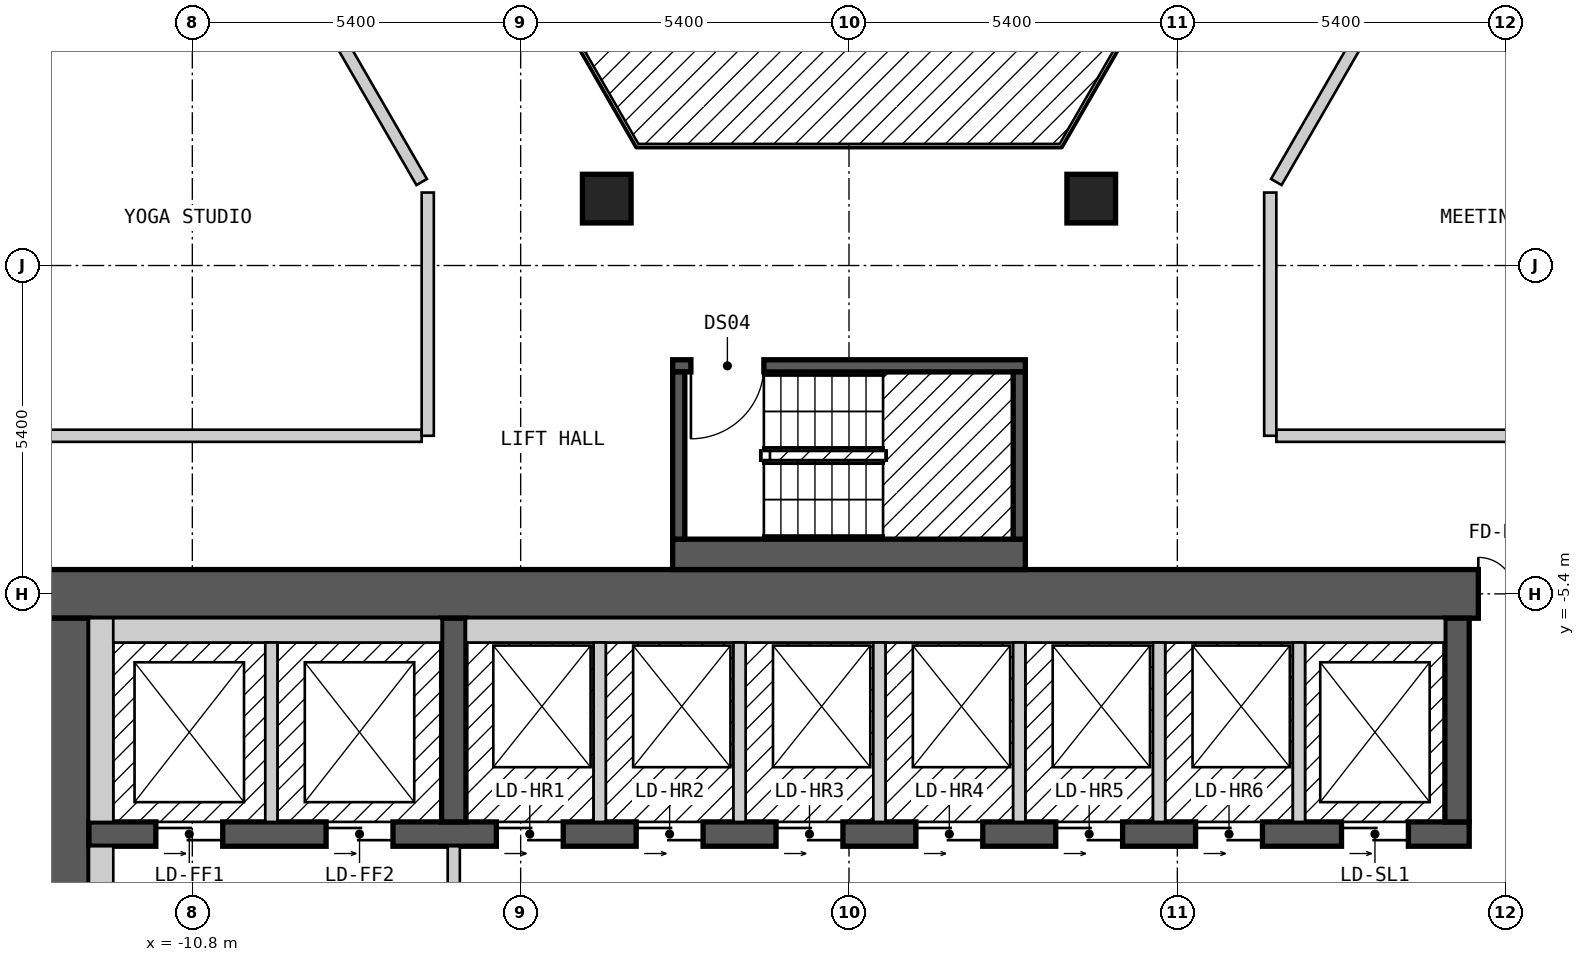
"""IFC4 building model, lengths in metres.
Left out: names, types, materials, properties, quantities, classifications, styles, units other than length and angle.
Written with IfcOpenShell. Run it as: python <this file> out.ifc"""

import sys

from ifc_helpers import new_model, si_unit, direction, frame, frame_2d, origin, origin_2d, place, context, subcontext, project, spatial, rectangle, extrude, element, fill, save


model = new_model("IFC4")
c1 = context("Model", 3, precision=1e-05, world=origin(), true_north=direction((0.0, 1.0)))
c2 = subcontext(c1, "Body", "Model", "MODEL_VIEW")
j1 = project(units=[si_unit("LENGTHUNIT", "METRE"), si_unit("PLANEANGLEUNIT", "RADIAN")], contexts=[c1])
p1 = place(None, origin())
s1 = spatial("IfcSite", under=j1, at=p1, CompositionType="ELEMENT")
p2 = place(p1, origin())
s2 = spatial("IfcBuilding", under=s1, at=p2, CompositionType="ELEMENT")
p3 = place(p2, frame((0.0, 0.0, 147.6)))
s3 = spatial("IfcBuildingStorey", under=s2, at=p3, CompositionType="ELEMENT", Elevation=147.6)
for number, where, z_axis, x_axis in (
    (1, (3.984, 1.1, 0.0), (0.0, 0.0, 1.0), (1.0, 0.0, 0.0)),
    (2, (-3.984, 1.1, 0.0), (0.0, 0.0, 1.0), (1.0, 0.0, 0.0)),
):
    element("IfcColumn", number, at=place(p3, frame(where, z_axis=z_axis, x_axis=x_axis)), inside=s3, PredefinedType="COLUMN", context=c2, shape_type="SweptSolid", body=[
        extrude(rectangle(XDim=0.8, YDim=0.8, at=origin_2d()), origin(), (0.0, 0.0, 1.0), 3.0),
    ])
p4 = place(p3, frame((-13.3, -5.4, 0.0), z_axis=(0.0, 0.0, 1.0), x_axis=(1.0, 0.0, 0.0)))
e3 = element("IfcWall", 3, at=p4, inside=s3, PredefinedType="SHEAR", context=c2, shape_type="SweptSolid", body=[
    extrude(rectangle(XDim=26.6, YDim=0.8, at=frame_2d((13.3, 0.0))), origin(), (0.0, 0.0, 1.0), 2.7),
])
p5 = place(p4, frame((23.65, 0.0, 0.0)))
e4 = element("IfcOpeningElement", 4, at=p5, cuts=e3, PredefinedType="OPENING", context=c2, shape_type="SweptSolid", body=[
    extrude(rectangle(XDim=1.2, YDim=2.1, at=frame_2d((0.6, 1.05))), frame((0.0, 0.41, 0.0), z_axis=(0.0, -1.0, 0.0), x_axis=(1.0, 0.0, 0.0)), (0.0, 0.0, 1.0), 0.82),
])
p6 = place(p3, frame((-12.9, -18.2, 0.0), z_axis=(0.0, 0.0, 1.0), x_axis=(0.0, 1.0, 0.0)))
e5 = element("IfcWall", 5, at=p6, inside=s3, PredefinedType="SHEAR", context=c2, shape_type="SweptSolid", body=[
    extrude(rectangle(XDim=12.4, YDim=0.8, at=frame_2d((6.2, 0.0))), origin(), (0.0, 0.0, 1.0), 2.7),
])
p7 = place(p6, frame((4.0, 0.0, 0.0)))
e6 = element("IfcOpeningElement", 6, at=p7, cuts=e5, PredefinedType="OPENING", context=c2, shape_type="SweptSolid", body=[
    extrude(rectangle(XDim=1.2, YDim=2.1, at=frame_2d((0.6, 1.05))), frame((0.0, 0.41, 0.0), z_axis=(0.0, -1.0, 0.0), x_axis=(1.0, 0.0, 0.0)), (0.0, 0.0, 1.0), 0.82),
])
p8 = place(p3, frame((-12.5, -9.35, 0.0), z_axis=(0.0, 0.0, 1.0), x_axis=(1.0, 0.0, 0.0)))
e7 = element("IfcWall", 7, at=p8, inside=s3, PredefinedType="SHEAR", context=c2, shape_type="SweptSolid", body=[
    extrude(rectangle(XDim=22.7, YDim=0.4, at=frame_2d((11.35, 0.0))), origin(), (0.0, 0.0, 1.0), 2.7),
])
p9 = place(p8, frame((1.1, 0.0, 0.0)))
e8 = element("IfcOpeningElement", 8, at=p9, cuts=e7, PredefinedType="OPENING", context=c2, shape_type="SweptSolid", body=[
    extrude(rectangle(XDim=1.1, YDim=2.1, at=frame_2d((0.55, 1.05))), frame((0.0, 0.21, 0.0), z_axis=(0.0, -1.0, 0.0), x_axis=(1.0, 0.0, 0.0)), (0.0, 0.0, 1.0), 0.42),
])
p10 = place(p8, frame((3.9, 0.0, 0.0)))
e9 = element("IfcOpeningElement", 9, at=p10, cuts=e7, PredefinedType="OPENING", context=c2, shape_type="SweptSolid", body=[
    extrude(rectangle(XDim=1.1, YDim=2.1, at=frame_2d((0.55, 1.05))), frame((0.0, 0.21, 0.0), z_axis=(0.0, -1.0, 0.0), x_axis=(1.0, 0.0, 0.0)), (0.0, 0.0, 1.0), 0.42),
])
p11 = place(p8, frame((6.7, 0.0, 0.0)))
e10 = element("IfcOpeningElement", 10, at=p11, cuts=e7, PredefinedType="OPENING", context=c2, shape_type="SweptSolid", body=[
    extrude(rectangle(XDim=1.1, YDim=2.1, at=frame_2d((0.55, 1.05))), frame((0.0, 0.21, 0.0), z_axis=(0.0, -1.0, 0.0), x_axis=(1.0, 0.0, 0.0)), (0.0, 0.0, 1.0), 0.42),
])
p12 = place(p8, frame((9.0, 0.0, 0.0)))
e11 = element("IfcOpeningElement", 11, at=p12, cuts=e7, PredefinedType="OPENING", context=c2, shape_type="SweptSolid", body=[
    extrude(rectangle(XDim=1.1, YDim=2.1, at=frame_2d((0.55, 1.05))), frame((0.0, 0.21, 0.0), z_axis=(0.0, -1.0, 0.0), x_axis=(1.0, 0.0, 0.0)), (0.0, 0.0, 1.0), 0.42),
])
p13 = place(p8, frame((11.3, 0.0, 0.0)))
e12 = element("IfcOpeningElement", 12, at=p13, cuts=e7, PredefinedType="OPENING", context=c2, shape_type="SweptSolid", body=[
    extrude(rectangle(XDim=1.1, YDim=2.1, at=frame_2d((0.55, 1.05))), frame((0.0, 0.21, 0.0), z_axis=(0.0, -1.0, 0.0), x_axis=(1.0, 0.0, 0.0)), (0.0, 0.0, 1.0), 0.42),
])
p14 = place(p8, frame((13.6, 0.0, 0.0)))
e13 = element("IfcOpeningElement", 13, at=p14, cuts=e7, PredefinedType="OPENING", context=c2, shape_type="SweptSolid", body=[
    extrude(rectangle(XDim=1.1, YDim=2.1, at=frame_2d((0.55, 1.05))), frame((0.0, 0.21, 0.0), z_axis=(0.0, -1.0, 0.0), x_axis=(1.0, 0.0, 0.0)), (0.0, 0.0, 1.0), 0.42),
])
p15 = place(p8, frame((15.9, 0.0, 0.0)))
e14 = element("IfcOpeningElement", 14, at=p15, cuts=e7, PredefinedType="OPENING", context=c2, shape_type="SweptSolid", body=[
    extrude(rectangle(XDim=1.1, YDim=2.1, at=frame_2d((0.55, 1.05))), frame((0.0, 0.21, 0.0), z_axis=(0.0, -1.0, 0.0), x_axis=(1.0, 0.0, 0.0)), (0.0, 0.0, 1.0), 0.42),
])
p16 = place(p8, frame((18.2, 0.0, 0.0)))
e15 = element("IfcOpeningElement", 15, at=p16, cuts=e7, PredefinedType="OPENING", context=c2, shape_type="SweptSolid", body=[
    extrude(rectangle(XDim=1.1, YDim=2.1, at=frame_2d((0.55, 1.05))), frame((0.0, 0.21, 0.0), z_axis=(0.0, -1.0, 0.0), x_axis=(1.0, 0.0, 0.0)), (0.0, 0.0, 1.0), 0.42),
])
p17 = place(p8, frame((20.6, 0.0, 0.0)))
e16 = element("IfcOpeningElement", 16, at=p17, cuts=e7, PredefinedType="OPENING", context=c2, shape_type="SweptSolid", body=[
    extrude(rectangle(XDim=1.1, YDim=2.1, at=frame_2d((0.55, 1.05))), frame((0.0, 0.21, 0.0), z_axis=(0.0, -1.0, 0.0), x_axis=(1.0, 0.0, 0.0)), (0.0, 0.0, 1.0), 0.42),
])
for number, where, z_axis, x_axis in (
    (17, (-6.5, -9.15, 0.0), (0.0, 0.0, 1.0), (0.0, 1.0, 0.0)),
    (18, (10.0, -9.15, 0.0), (0.0, 0.0, 1.0), (0.0, 1.0, 0.0)),
):
    element("IfcWall", number, at=place(p3, frame(where, z_axis=z_axis, x_axis=x_axis)), inside=s3, PredefinedType="SHEAR", context=c2, shape_type="SweptSolid", body=[
        extrude(rectangle(XDim=3.35, YDim=0.4, at=frame_2d((1.675, 0.0))), origin(), (0.0, 0.0, 1.0), 2.7),
    ])
p18 = place(p3, frame((-2.9, -4.75, 0.0), z_axis=(0.0, 0.0, 1.0), x_axis=(1.0, 0.0, 0.0)))
e19 = element("IfcWall", 19, at=p18, inside=s3, PredefinedType="SOLIDWALL", context=c2, shape_type="SweptSolid", body=[
    extrude(rectangle(XDim=5.8, YDim=0.5, at=frame_2d((2.9, 0.0))), origin(), (0.0, 0.0, 1.0), 2.7),
])
p19 = place(p3, frame((-2.9, -1.65, 0.0), z_axis=(0.0, 0.0, 1.0), x_axis=(1.0, 0.0, 0.0)))
e20 = element("IfcWall", 20, at=p19, inside=s3, PredefinedType="SOLIDWALL", context=c2, shape_type="SweptSolid", body=[
    extrude(rectangle(XDim=5.8, YDim=0.2, at=frame_2d((2.9, 0.0))), origin(), (0.0, 0.0, 1.0), 2.7),
])
p20 = place(p19, frame((0.3, 0.0, 0.0)))
e21 = element("IfcOpeningElement", 21, at=p20, cuts=e20, PredefinedType="OPENING", context=c2, shape_type="SweptSolid", body=[
    extrude(rectangle(XDim=1.2, YDim=2.1, at=frame_2d((0.6, 1.05))), frame((0.0, 0.11, 0.0), z_axis=(0.0, -1.0, 0.0), x_axis=(1.0, 0.0, 0.0)), (0.0, 0.0, 1.0), 0.22),
])
for number, where, z_axis, x_axis in (
    (22, (-2.8, -4.5, 0.0), (0.0, 0.0, 1.0), (0.0, 1.0, 0.0)),
    (23, (2.8, -4.5, 0.0), (0.0, 0.0, 1.0), (0.0, 1.0, 0.0)),
):
    element("IfcWall", number, at=place(p3, frame(where, z_axis=z_axis, x_axis=x_axis)), inside=s3, PredefinedType="SOLIDWALL", context=c2, shape_type="SweptSolid", body=[
        extrude(rectangle(XDim=2.75, YDim=0.2, at=frame_2d((1.375, 0.0))), origin(), (0.0, 0.0, 1.0), 2.7),
    ])
p21 = place(p3, frame((-10.796, 7.9, 0.0), z_axis=(0.0, 0.0, 1.0), x_axis=(0.499954271211, -0.866051803703, 0.0)))
e24 = element("IfcWall", 24, at=p21, inside=s3, PredefinedType="PARTITIONING", context=c2, shape_type="SweptSolid", body=[
    extrude(rectangle(XDim=7.536, YDim=0.2, at=frame_2d((3.768, 0.0))), origin(), (0.0, 0.0, 1.0), 2.7),
])
p22 = place(p3, frame((7.967, 13.0, 0.0), z_axis=(0.0, 0.0, 1.0), x_axis=(0.50003774998, -0.866003607726, 0.0)))
e25 = element("IfcWall", 25, at=p22, inside=s3, PredefinedType="PARTITIONING", context=c2, shape_type="SweptSolid", body=[
    extrude(rectangle(XDim=14.433, YDim=0.2, at=frame_2d((7.217, 0.0))), origin(), (0.0, 0.0, 1.0), 2.7),
])
p23 = place(p22, frame((6.824, 0.0, 0.0)))
e26 = element("IfcOpeningElement", 26, at=p23, cuts=e25, PredefinedType="OPENING", context=c2, shape_type="SweptSolid", body=[
    extrude(rectangle(XDim=0.9, YDim=2.1, at=frame_2d((0.45, 1.05))), frame((0.0, 0.11, 0.0), z_axis=(0.0, -1.0, 0.0), x_axis=(1.0, 0.0, 0.0)), (0.0, 0.0, 1.0), 0.22),
])
p24 = place(p3, frame((9.296, 15.1, 0.0), z_axis=(0.0, 0.0, 1.0), x_axis=(0.499974024244, -0.866040400375, 0.0)))
e27 = element("IfcWall", 27, at=p24, inside=s3, PredefinedType="PARTITIONING", context=c2, shape_type="SweptSolid", body=[
    extrude(rectangle(XDim=16.857, YDim=0.2, at=frame_2d((8.429, 0.0))), origin(), (0.0, 0.0, 1.0), 2.7),
])
p25 = place(p24, frame((5.209, 0.0, 0.0)))
e28 = element("IfcOpeningElement", 28, at=p25, cuts=e27, PredefinedType="OPENING", context=c2, shape_type="SweptSolid", body=[
    extrude(rectangle(XDim=1.0, YDim=2.1, at=frame_2d((0.5, 1.05))), frame((0.0, 0.11, 0.0), z_axis=(0.0, -1.0, 0.0), x_axis=(1.0, 0.0, 0.0)), (0.0, 0.0, 1.0), 0.22),
])
p26 = place(p3, frame((-13.395, -2.8, 0.0), z_axis=(0.0, 0.0, 1.0), x_axis=(1.0, 0.0, 0.0)))
e29 = element("IfcWall", 29, at=p26, inside=s3, PredefinedType="PARTITIONING", context=c2, shape_type="SweptSolid", body=[
    extrude(rectangle(XDim=6.367, YDim=0.2, at=frame_2d((3.184, 0.0))), origin(), (0.0, 0.0, 1.0), 2.7),
])
p27 = place(p3, frame((7.028, -2.8, 0.0), z_axis=(0.0, 0.0, 1.0), x_axis=(1.0, 0.0, 0.0)))
e30 = element("IfcWall", 30, at=p27, inside=s3, PredefinedType="PARTITIONING", context=c2, shape_type="SweptSolid", body=[
    extrude(rectangle(XDim=6.25, YDim=0.2, at=frame_2d((3.125, 0.0))), origin(), (0.0, 0.0, 1.0), 2.7),
])
p28 = place(p3, frame((7.028, 1.373, 0.0), z_axis=(0.0, 0.0, 1.0), x_axis=(0.499954271211, 0.866051803703, 0.0)))
e31 = element("IfcWall", 31, at=p28, inside=s3, PredefinedType="PARTITIONING", context=c2, shape_type="SweptSolid", body=[
    extrude(rectangle(XDim=7.536, YDim=0.2, at=frame_2d((3.768, 0.0))), origin(), (0.0, 0.0, 1.0), 2.7),
])
p29 = place(p3, frame((-15.242, 0.399, 0.0), z_axis=(0.0, 0.0, 1.0), x_axis=(0.499953615651, 0.866052182145, 0.0)))
e32 = element("IfcWall", 32, at=p29, inside=s3, PredefinedType="PARTITIONING", context=c2, shape_type="SweptSolid", body=[
    extrude(rectangle(XDim=8.777, YDim=0.2, at=frame_2d((4.388, 0.0))), origin(), (0.0, 0.0, 1.0), 2.7),
])
p30 = place(p29, frame((3.938, 0.0, 0.0)))
e33 = element("IfcOpeningElement", 33, at=p30, cuts=e32, PredefinedType="OPENING", context=c2, shape_type="SweptSolid", body=[
    extrude(rectangle(XDim=0.9, YDim=2.1, at=frame_2d((0.45, 1.05))), frame((0.0, 0.11, 0.0), z_axis=(0.0, -1.0, 0.0), x_axis=(1.0, 0.0, 0.0)), (0.0, 0.0, 1.0), 0.22),
])
p31 = place(p3, frame((-17.724, 0.5, 0.0), z_axis=(0.0, 0.0, 1.0), x_axis=(0.499994801602, 0.86602840506, 0.0)))
e34 = element("IfcWall", 34, at=p31, inside=s3, PredefinedType="PARTITIONING", context=c2, shape_type="SweptSolid", body=[
    extrude(rectangle(XDim=16.916, YDim=0.2, at=frame_2d((8.458, 0.0))), origin(), (0.0, 0.0, 1.0), 2.7),
])
p32 = place(p31, frame((10.672, 0.0, 0.0)))
e35 = element("IfcOpeningElement", 35, at=p32, cuts=e34, PredefinedType="OPENING", context=c2, shape_type="SweptSolid", body=[
    extrude(rectangle(XDim=1.0, YDim=2.1, at=frame_2d((0.5, 1.05))), frame((0.0, 0.11, 0.0), z_axis=(0.0, -1.0, 0.0), x_axis=(1.0, 0.0, 0.0)), (0.0, 0.0, 1.0), 0.22),
])
p33 = place(p31, frame((5.187, 0.0, 0.0)))
e36 = element("IfcOpeningElement", 36, at=p33, cuts=e34, PredefinedType="OPENING", context=c2, shape_type="SweptSolid", body=[
    extrude(rectangle(XDim=1.0, YDim=2.1, at=frame_2d((0.5, 1.05))), frame((0.0, 0.11, 0.0), z_axis=(0.0, -1.0, 0.0), x_axis=(1.0, 0.0, 0.0)), (0.0, 0.0, 1.0), 0.22),
])
p34 = place(p31, frame((0.566, 0.0, 0.0)))
e37 = element("IfcOpeningElement", 37, at=p34, cuts=e34, PredefinedType="OPENING", context=c2, shape_type="SweptSolid", body=[
    extrude(rectangle(XDim=1.0, YDim=2.1, at=frame_2d((0.5, 1.05))), frame((0.0, 0.11, 0.0), z_axis=(0.0, -1.0, 0.0), x_axis=(1.0, 0.0, 0.0)), (0.0, 0.0, 1.0), 0.22),
])
for number, where, z_axis, x_axis in (
    (38, (6.928, -2.8, 0.0), (0.0, 0.0, 1.0), (0.0, 1.0, 0.0)),
    (39, (-6.928, -2.8, 0.0), (0.0, 0.0, 1.0), (0.0, 1.0, 0.0)),
):
    element("IfcWall", number, at=place(p3, frame(where, z_axis=z_axis, x_axis=x_axis)), inside=s3, PredefinedType="PARTITIONING", context=c2, shape_type="SweptSolid", body=[
        extrude(rectangle(XDim=4.0, YDim=0.2, at=frame_2d((2.0, 0.0))), origin(), (0.0, 0.0, 1.0), 2.7),
    ])
p35 = place(p3, frame((-12.3, -13.0, 0.0), z_axis=(0.0, 0.0, 1.0), x_axis=(0.0, 1.0, 0.0)))
e40 = element("IfcWall", 40, at=p35, inside=s3, PredefinedType="PARTITIONING", context=c2, shape_type="SweptSolid", body=[
    extrude(rectangle(XDim=3.45, YDim=0.4, at=frame_2d((1.725, 0.0))), origin(), (0.0, 0.0, 1.0), 2.7),
])
p36 = place(p3, frame((-12.3, -9.15, 0.0), z_axis=(0.0, 0.0, 1.0), x_axis=(0.0, 1.0, 0.0)))
e41 = element("IfcWall", 41, at=p36, inside=s3, PredefinedType="SOLIDWALL", context=c2, shape_type="SweptSolid", body=[
    extrude(rectangle(XDim=3.35, YDim=0.4, at=frame_2d((1.675, 0.0))), origin(), (0.0, 0.0, 1.0), 2.7),
])
p37 = place(p3, frame((-12.1, -6.0, 0.0), z_axis=(0.0, 0.0, 1.0), x_axis=(1.0, 0.0, 0.0)))
e42 = element("IfcWall", 42, at=p37, inside=s3, PredefinedType="SOLIDWALL", context=c2, shape_type="SweptSolid", body=[
    extrude(rectangle(XDim=5.4, YDim=0.4, at=frame_2d((2.7, 0.0))), origin(), (0.0, 0.0, 1.0), 2.7),
])
p38 = place(p3, frame((-9.5, -9.15, 0.0), z_axis=(0.0, 0.0, 1.0), x_axis=(0.0, 1.0, 0.0)))
e43 = element("IfcWall", 43, at=p38, inside=s3, PredefinedType="SOLIDWALL", context=c2, shape_type="SweptSolid", body=[
    extrude(rectangle(XDim=2.95, YDim=0.2, at=frame_2d((1.475, 0.0))), origin(), (0.0, 0.0, 1.0), 2.7),
])
p39 = place(p3, frame((-6.5, -14.45, 0.0), z_axis=(0.0, 0.0, 1.0), x_axis=(0.0, 1.0, 0.0)))
e44 = element("IfcWall", 44, at=p39, inside=s3, PredefinedType="PARTITIONING", context=c2, shape_type="SweptSolid", body=[
    extrude(rectangle(XDim=4.9, YDim=0.2, at=frame_2d((2.45, 0.0))), origin(), (0.0, 0.0, 1.0), 2.7),
])
p40 = place(p39, frame((3.15, 0.0, 0.0), z_axis=(0.0, 0.0, 1.0), x_axis=(-1.0, 0.0, 0.0)))
e45 = element("IfcOpeningElement", 45, at=p40, cuts=e44, PredefinedType="OPENING", context=c2, shape_type="SweptSolid", body=[
    extrude(rectangle(XDim=1.4, YDim=2.1, at=frame_2d((0.7, 1.05))), frame((0.0, 0.11, 0.0), z_axis=(0.0, -1.0, 0.0), x_axis=(1.0, 0.0, 0.0)), (0.0, 0.0, 1.0), 0.22),
])
p41 = place(p3, frame((-6.3, -6.0, 0.0), z_axis=(0.0, 0.0, 1.0), x_axis=(1.0, 0.0, 0.0)))
e46 = element("IfcWall", 46, at=p41, inside=s3, PredefinedType="SOLIDWALL", context=c2, shape_type="SweptSolid", body=[
    extrude(rectangle(XDim=16.1, YDim=0.4, at=frame_2d((8.05, 0.0))), origin(), (0.0, 0.0, 1.0), 2.7),
])
for number, where, z_axis, x_axis in (
    (47, (-4.1, -9.15, 0.0), (0.0, 0.0, 1.0), (0.0, 1.0, 0.0)),
    (48, (-1.8, -9.15, 0.0), (0.0, 0.0, 1.0), (0.0, 1.0, 0.0)),
    (49, (0.5, -9.15, 0.0), (0.0, 0.0, 1.0), (0.0, 1.0, 0.0)),
    (50, (2.8, -9.15, 0.0), (0.0, 0.0, 1.0), (0.0, 1.0, 0.0)),
    (51, (5.1, -9.15, 0.0), (0.0, 0.0, 1.0), (0.0, 1.0, 0.0)),
    (52, (7.4, -9.15, 0.0), (0.0, 0.0, 1.0), (0.0, 1.0, 0.0)),
):
    element("IfcWall", number, at=place(p3, frame(where, z_axis=z_axis, x_axis=x_axis)), inside=s3, PredefinedType="SOLIDWALL", context=c2, shape_type="SweptSolid", body=[
        extrude(rectangle(XDim=2.95, YDim=0.2, at=frame_2d((1.475, 0.0))), origin(), (0.0, 0.0, 1.0), 2.7),
    ])
p42 = place(p20, origin())
e53 = element("IfcDoor", 53, at=p42, inside=s3, OperationType="SINGLE_SWING_LEFT", PredefinedType="DOOR", context=c2, shape_type="SweptSolid", body=[
    extrude(rectangle(XDim=1.2, YDim=2.1, at=frame_2d((0.6, 1.05))), frame((0.0, 0.025, 0.0), z_axis=(0.0, -1.0, 0.0), x_axis=(1.0, 0.0, 0.0)), (0.0, 0.0, 1.0), 0.05),
])
fill(e21, e53)
p43 = place(p9, origin())
e54 = element("IfcDoor", 54, at=p43, inside=s3, OperationType="DOUBLE_DOOR_SLIDING", PredefinedType="DOOR", context=c2, shape_type="SweptSolid", body=[
    extrude(rectangle(XDim=1.1, YDim=2.1, at=frame_2d((0.55, 1.05))), frame((0.0, 0.025, 0.0), z_axis=(0.0, -1.0, 0.0), x_axis=(1.0, 0.0, 0.0)), (0.0, 0.0, 1.0), 0.05),
])
fill(e8, e54)
p44 = place(p10, origin())
e55 = element("IfcDoor", 55, at=p44, inside=s3, OperationType="DOUBLE_DOOR_SLIDING", PredefinedType="DOOR", context=c2, shape_type="SweptSolid", body=[
    extrude(rectangle(XDim=1.1, YDim=2.1, at=frame_2d((0.55, 1.05))), frame((0.0, 0.025, 0.0), z_axis=(0.0, -1.0, 0.0), x_axis=(1.0, 0.0, 0.0)), (0.0, 0.0, 1.0), 0.05),
])
fill(e9, e55)
p45 = place(p11, origin())
e56 = element("IfcDoor", 56, at=p45, inside=s3, OperationType="DOUBLE_DOOR_SLIDING", PredefinedType="DOOR", context=c2, shape_type="SweptSolid", body=[
    extrude(rectangle(XDim=1.1, YDim=2.1, at=frame_2d((0.55, 1.05))), frame((0.0, 0.025, 0.0), z_axis=(0.0, -1.0, 0.0), x_axis=(1.0, 0.0, 0.0)), (0.0, 0.0, 1.0), 0.05),
])
fill(e10, e56)
p46 = place(p12, origin())
e57 = element("IfcDoor", 57, at=p46, inside=s3, OperationType="DOUBLE_DOOR_SLIDING", PredefinedType="DOOR", context=c2, shape_type="SweptSolid", body=[
    extrude(rectangle(XDim=1.1, YDim=2.1, at=frame_2d((0.55, 1.05))), frame((0.0, 0.025, 0.0), z_axis=(0.0, -1.0, 0.0), x_axis=(1.0, 0.0, 0.0)), (0.0, 0.0, 1.0), 0.05),
])
fill(e11, e57)
p47 = place(p13, origin())
e58 = element("IfcDoor", 58, at=p47, inside=s3, OperationType="DOUBLE_DOOR_SLIDING", PredefinedType="DOOR", context=c2, shape_type="SweptSolid", body=[
    extrude(rectangle(XDim=1.1, YDim=2.1, at=frame_2d((0.55, 1.05))), frame((0.0, 0.025, 0.0), z_axis=(0.0, -1.0, 0.0), x_axis=(1.0, 0.0, 0.0)), (0.0, 0.0, 1.0), 0.05),
])
fill(e12, e58)
p48 = place(p14, origin())
e59 = element("IfcDoor", 59, at=p48, inside=s3, OperationType="DOUBLE_DOOR_SLIDING", PredefinedType="DOOR", context=c2, shape_type="SweptSolid", body=[
    extrude(rectangle(XDim=1.1, YDim=2.1, at=frame_2d((0.55, 1.05))), frame((0.0, 0.025, 0.0), z_axis=(0.0, -1.0, 0.0), x_axis=(1.0, 0.0, 0.0)), (0.0, 0.0, 1.0), 0.05),
])
fill(e13, e59)
p49 = place(p15, origin())
e60 = element("IfcDoor", 60, at=p49, inside=s3, OperationType="DOUBLE_DOOR_SLIDING", PredefinedType="DOOR", context=c2, shape_type="SweptSolid", body=[
    extrude(rectangle(XDim=1.1, YDim=2.1, at=frame_2d((0.55, 1.05))), frame((0.0, 0.025, 0.0), z_axis=(0.0, -1.0, 0.0), x_axis=(1.0, 0.0, 0.0)), (0.0, 0.0, 1.0), 0.05),
])
fill(e14, e60)
p50 = place(p16, origin())
e61 = element("IfcDoor", 61, at=p50, inside=s3, OperationType="DOUBLE_DOOR_SLIDING", PredefinedType="DOOR", context=c2, shape_type="SweptSolid", body=[
    extrude(rectangle(XDim=1.1, YDim=2.1, at=frame_2d((0.55, 1.05))), frame((0.0, 0.025, 0.0), z_axis=(0.0, -1.0, 0.0), x_axis=(1.0, 0.0, 0.0)), (0.0, 0.0, 1.0), 0.05),
])
fill(e15, e61)
p51 = place(p17, origin())
e62 = element("IfcDoor", 62, at=p51, inside=s3, OperationType="DOUBLE_DOOR_SLIDING", PredefinedType="DOOR", context=c2, shape_type="SweptSolid", body=[
    extrude(rectangle(XDim=1.1, YDim=2.1, at=frame_2d((0.55, 1.05))), frame((0.0, 0.025, 0.0), z_axis=(0.0, -1.0, 0.0), x_axis=(1.0, 0.0, 0.0)), (0.0, 0.0, 1.0), 0.05),
])
fill(e16, e62)
p52 = place(p5, origin())
e63 = element("IfcDoor", 63, at=p52, inside=s3, OperationType="DOUBLE_DOOR_SINGLE_SWING", PredefinedType="DOOR", context=c2, shape_type="SweptSolid", body=[
    extrude(rectangle(XDim=1.2, YDim=2.1, at=frame_2d((0.6, 1.05))), frame((0.0, 0.025, 0.0), z_axis=(0.0, -1.0, 0.0), x_axis=(1.0, 0.0, 0.0)), (0.0, 0.0, 1.0), 0.05),
])
fill(e4, e63)
save(model, sys.argv[1])
